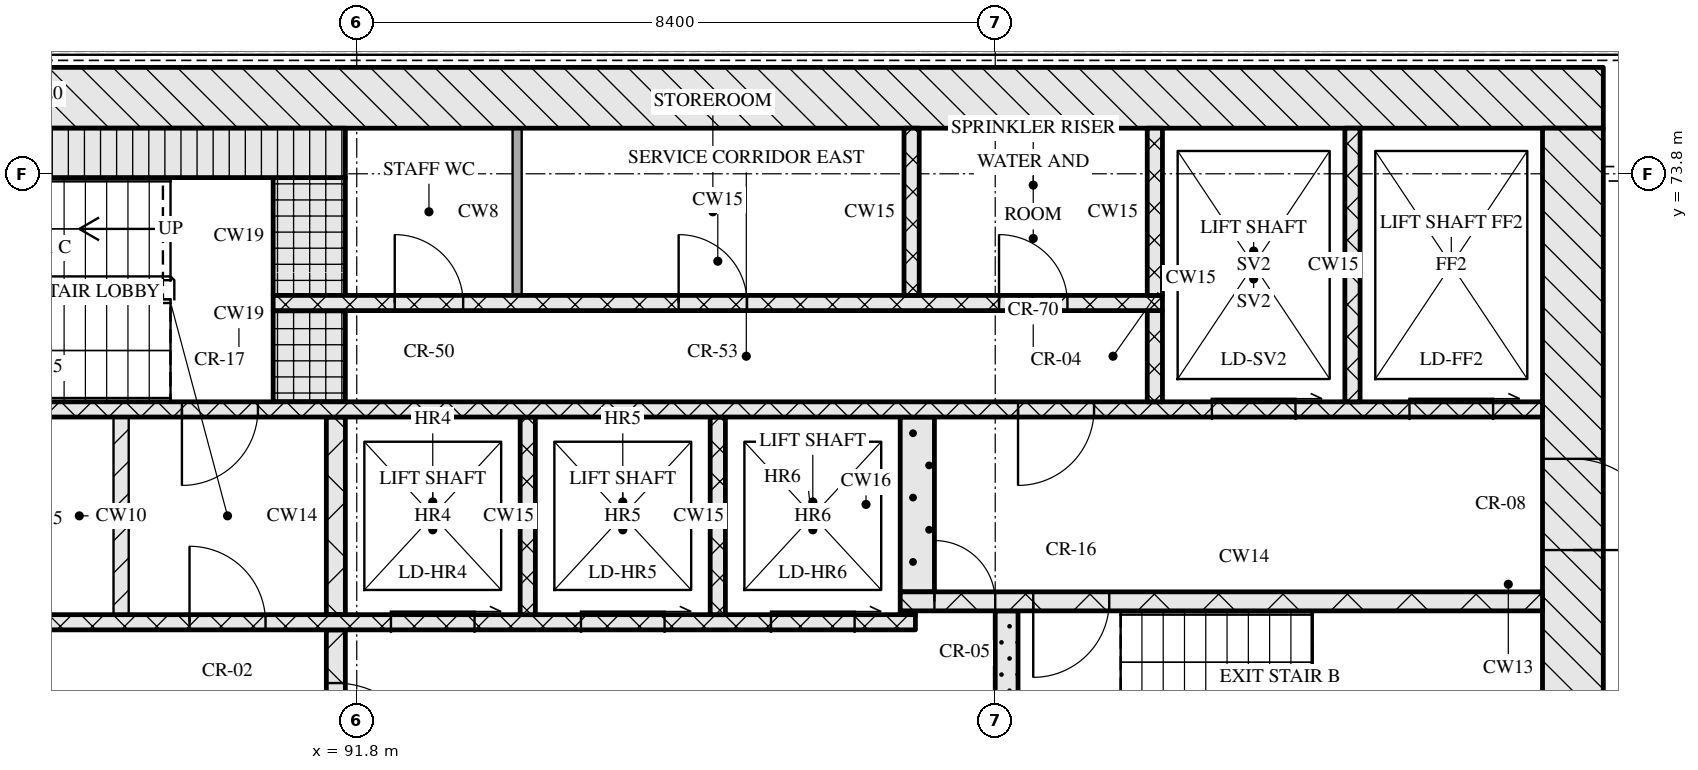
"""IFC4 building model, lengths in metres.
Left out: names, types, materials, properties, quantities, classifications, styles, units other than length and angle.
Written with IfcOpenShell. Run it as: python <this file> out.ifc"""

import sys

from ifc_helpers import new_model, si_unit, direction, frame, frame_2d, origin, place, context, subcontext, project, spatial, rectangle, extrude, element, fill, save


model = new_model("IFC4")
c1 = context("Model", 3, precision=1e-05, world=origin(), true_north=direction((0.0, 1.0)))
c2 = subcontext(c1, "Body", "Model", "MODEL_VIEW")
j1 = project(units=[si_unit("LENGTHUNIT", "METRE"), si_unit("PLANEANGLEUNIT", "RADIAN")], contexts=[c1])
p1 = place(None, origin())
s1 = spatial("IfcSite", under=j1, at=p1, CompositionType="ELEMENT")
p2 = place(p1, origin())
s2 = spatial("IfcBuilding", under=s1, at=p2, CompositionType="ELEMENT")
p3 = place(p2, frame((0.0, 0.0, 165.45)))
s3 = spatial("IfcBuildingStorey", under=s2, at=p3, CompositionType="ELEMENT", Elevation=165.45)
p4 = place(p3, frame((67.0, 74.8, 0.0), z_axis=(0.0, 0.0, 1.0), x_axis=(1.0, 0.0, 0.0)))
e1 = element("IfcWall", 1, at=p4, inside=s3, PredefinedType="SOLIDWALL", context=c2, shape_type="SweptSolid", body=[
    extrude(rectangle(XDim=41.2, YDim=0.8, at=frame_2d((20.6, 0.0))), origin(), (0.0, 0.0, 1.0), 3.32),
])
p5 = place(p3, frame((107.8, 62.4, 0.0), z_axis=(0.0, 0.0, 1.0), x_axis=(0.0, 1.0, 0.0)))
e2 = element("IfcWall", 2, at=p5, inside=s3, PredefinedType="SOLIDWALL", context=c2, shape_type="SweptSolid", body=[
    extrude(rectangle(XDim=12.0, YDim=0.8, at=frame_2d((6.0, 0.0))), origin(), (0.0, 0.0, 1.0), 3.32),
])
p6 = place(p5, frame((6.45, 0.0, 0.0)))
e3 = element("IfcOpeningElement", 3, at=p6, cuts=e2, PredefinedType="OPENING", context=c2, shape_type="SweptSolid", body=[
    extrude(rectangle(XDim=1.2, YDim=2.1, at=frame_2d((0.6, 1.05))), frame((0.0, 0.41, 0.0), z_axis=(0.0, -1.0, 0.0), x_axis=(1.0, 0.0, 0.0)), (0.0, 0.0, 1.0), 0.82),
])
p7 = place(p3, frame((91.525, 65.2, 0.0), z_axis=(0.0, 0.0, 1.0), x_axis=(0.0, 1.0, 0.0)))
e4 = element("IfcWall", 4, at=p7, inside=s3, PredefinedType="SOLIDWALL", context=c2, shape_type="SweptSolid", body=[
    extrude(rectangle(XDim=2.6, YDim=0.25, at=frame_2d((1.3, 0.0))), origin(), (0.0, 0.0, 1.0), 3.32),
])
p8 = place(p7, frame((0.7, 0.0, 0.0)))
e5 = element("IfcOpeningElement", 5, at=p8, cuts=e4, PredefinedType="OPENING", context=c2, shape_type="SweptSolid", body=[
    extrude(rectangle(XDim=1.2, YDim=2.1, at=frame_2d((0.6, 1.05))), frame((0.0, 0.135, 0.0), z_axis=(0.0, -1.0, 0.0), x_axis=(1.0, 0.0, 0.0)), (0.0, 0.0, 1.0), 0.27),
])
p9 = place(p3, frame((100.35, 65.2, 0.0), z_axis=(0.0, 0.0, 1.0), x_axis=(0.0, 1.0, 0.0)))
e6 = element("IfcWall", 6, at=p9, inside=s3, PredefinedType="SOLIDWALL", context=c2, shape_type="SweptSolid", body=[
    extrude(rectangle(XDim=2.85, YDim=0.3, at=frame_2d((1.425, 0.0))), origin(), (0.0, 0.0, 1.0), 3.32),
])
p10 = place(p3, frame((76.05, 67.9, 0.0), z_axis=(0.0, 0.0, 1.0), x_axis=(1.0, 0.0, 0.0)))
e7 = element("IfcWall", 7, at=p10, inside=s3, PredefinedType="SOLIDWALL", context=c2, shape_type="SweptSolid", body=[
    extrude(rectangle(XDim=23.1, YDim=0.2, at=frame_2d((11.55, 0.0))), origin(), (0.0, 0.0, 1.0), 3.32),
])
p11 = place(p10, frame((3.2, 0.0, 0.0)))
e8 = element("IfcOpeningElement", 8, at=p11, cuts=e7, PredefinedType="OPENING", context=c2, shape_type="SweptSolid", body=[
    extrude(rectangle(XDim=0.9, YDim=2.1, at=frame_2d((0.45, 1.05))), frame((0.0, 0.11, 0.0), z_axis=(0.0, -1.0, 0.0), x_axis=(1.0, 0.0, 0.0)), (0.0, 0.0, 1.0), 0.22),
])
p12 = place(p10, frame((9.7, 0.0, 0.0)))
e9 = element("IfcOpeningElement", 9, at=p12, cuts=e7, PredefinedType="OPENING", context=c2, shape_type="SweptSolid", body=[
    extrude(rectangle(XDim=0.9, YDim=2.1, at=frame_2d((0.45, 1.05))), frame((0.0, 0.11, 0.0), z_axis=(0.0, -1.0, 0.0), x_axis=(1.0, 0.0, 0.0)), (0.0, 0.0, 1.0), 0.22),
])
p13 = place(p10, frame((13.55, 0.0, 0.0)))
e10 = element("IfcOpeningElement", 10, at=p13, cuts=e7, PredefinedType="OPENING", context=c2, shape_type="SweptSolid", body=[
    extrude(rectangle(XDim=1.0, YDim=2.1, at=frame_2d((0.5, 1.05))), frame((0.0, 0.11, 0.0), z_axis=(0.0, -1.0, 0.0), x_axis=(1.0, 0.0, 0.0)), (0.0, 0.0, 1.0), 0.22),
])
p14 = place(p10, frame((16.2, 0.0, 0.0)))
e11 = element("IfcOpeningElement", 11, at=p14, cuts=e7, PredefinedType="OPENING", context=c2, shape_type="SweptSolid", body=[
    extrude(rectangle(XDim=1.1, YDim=2.1, at=frame_2d((0.55, 1.05))), frame((0.0, 0.11, 0.0), z_axis=(0.0, -1.0, 0.0), x_axis=(1.0, 0.0, 0.0)), (0.0, 0.0, 1.0), 0.22),
])
p15 = place(p10, frame((18.7, 0.0, 0.0)))
e12 = element("IfcOpeningElement", 12, at=p15, cuts=e7, PredefinedType="OPENING", context=c2, shape_type="SweptSolid", body=[
    extrude(rectangle(XDim=1.1, YDim=2.1, at=frame_2d((0.55, 1.05))), frame((0.0, 0.11, 0.0), z_axis=(0.0, -1.0, 0.0), x_axis=(1.0, 0.0, 0.0)), (0.0, 0.0, 1.0), 0.22),
])
p16 = place(p10, frame((21.2, 0.0, 0.0)))
e13 = element("IfcOpeningElement", 13, at=p16, cuts=e7, PredefinedType="OPENING", context=c2, shape_type="SweptSolid", body=[
    extrude(rectangle(XDim=1.1, YDim=2.1, at=frame_2d((0.55, 1.05))), frame((0.0, 0.11, 0.0), z_axis=(0.0, -1.0, 0.0), x_axis=(1.0, 0.0, 0.0)), (0.0, 0.0, 1.0), 0.22),
])
p17 = place(p3, frame((88.7, 68.0, 0.0), z_axis=(0.0, 0.0, 1.0), x_axis=(0.0, 1.0, 0.0)))
e14 = element("IfcWall", 14, at=p17, inside=s3, PredefinedType="PARTITIONING", context=c2, shape_type="SweptSolid", body=[
    extrude(rectangle(XDim=2.6, YDim=0.2, at=frame_2d((1.3, 0.0))), origin(), (0.0, 0.0, 1.0), 3.32),
])
p18 = place(p3, frame((91.525, 68.0, 0.0), z_axis=(0.0, 0.0, 1.0), x_axis=(0.0, 1.0, 0.0)))
e15 = element("IfcWall", 15, at=p18, inside=s3, PredefinedType="SOLIDWALL", context=c2, shape_type="SweptSolid", body=[
    extrude(rectangle(XDim=2.6, YDim=0.25, at=frame_2d((1.3, 0.0))), origin(), (0.0, 0.0, 1.0), 3.32),
])
for number, where, z_axis, x_axis in (
    (16, (94.05, 68.0, 0.0), (0.0, 0.0, 1.0), (0.0, 1.0, 0.0)),
    (17, (96.55, 68.0, 0.0), (0.0, 0.0, 1.0), (0.0, 1.0, 0.0)),
):
    element("IfcWall", number, at=place(p3, frame(where, z_axis=z_axis, x_axis=x_axis)), inside=s3, PredefinedType="SOLIDWALL", context=c2, shape_type="SweptSolid", body=[
        extrude(rectangle(XDim=2.6, YDim=0.2, at=frame_2d((1.3, 0.0))), origin(), (0.0, 0.0, 1.0), 3.32),
    ])
p19 = place(p3, frame((98.95, 68.025, 0.0), z_axis=(0.0, 0.0, 1.0), x_axis=(1.0, 0.0, 0.0)))
e18 = element("IfcWall", 18, at=p19, inside=s3, PredefinedType="SOLIDWALL", context=c2, shape_type="SweptSolid", body=[
    extrude(rectangle(XDim=0.2, YDim=0.05, at=frame_2d((0.1, 0.0))), origin(), (0.0, 0.0, 1.0), 3.32),
])
p20 = place(p3, frame((98.95, 68.175, 0.0), z_axis=(0.0, 0.0, 1.0), x_axis=(1.0, 0.0, 0.0)))
e19 = element("IfcWall", 19, at=p20, inside=s3, PredefinedType="SOLIDWALL", context=c2, shape_type="SweptSolid", body=[
    extrude(rectangle(XDim=8.45, YDim=0.25, at=frame_2d((4.225, 0.0))), origin(), (0.0, 0.0, 1.0), 3.32),
])
p21 = place(p20, frame((0.45, 0.0, 0.0)))
e20 = element("IfcOpeningElement", 20, at=p21, cuts=e19, PredefinedType="OPENING", context=c2, shape_type="SweptSolid", body=[
    extrude(rectangle(XDim=0.8, YDim=2.1, at=frame_2d((0.4, 1.05))), frame((0.0, 0.135, 0.0), z_axis=(0.0, -1.0, 0.0), x_axis=(1.0, 0.0, 0.0)), (0.0, 0.0, 1.0), 0.27),
])
p22 = place(p20, frame((1.75, 0.0, 0.0)))
e21 = element("IfcOpeningElement", 21, at=p22, cuts=e19, PredefinedType="OPENING", context=c2, shape_type="SweptSolid", body=[
    extrude(rectangle(XDim=1.0, YDim=2.1, at=frame_2d((0.5, 1.05))), frame((0.0, 0.135, 0.0), z_axis=(0.0, -1.0, 0.0), x_axis=(1.0, 0.0, 0.0)), (0.0, 0.0, 1.0), 0.27),
])
p23 = place(p3, frame((99.175, 68.3, 0.0), z_axis=(0.0, 0.0, 1.0), x_axis=(0.0, 1.0, 0.0)))
e22 = element("IfcWall", 22, at=p23, inside=s3, PredefinedType="SOLIDWALL", context=c2, shape_type="SweptSolid", body=[
    extrude(rectangle(XDim=2.3, YDim=0.45, at=frame_2d((1.15, 0.0))), origin(), (0.0, 0.0, 1.0), 3.32),
])
p24 = place(p3, frame((67.8, 70.7, 0.0), z_axis=(0.0, 0.0, 1.0), x_axis=(1.0, 0.0, 0.0)))
e23 = element("IfcWall", 23, at=p24, inside=s3, PredefinedType="SOLIDWALL", context=c2, shape_type="SweptSolid", body=[
    extrude(rectangle(XDim=39.6, YDim=0.2, at=frame_2d((19.8, 0.0))), origin(), (0.0, 0.0, 1.0), 3.32),
])
p25 = place(p24, frame((0.65, 0.0, 0.0)))
e24 = element("IfcOpeningElement", 24, at=p25, cuts=e23, PredefinedType="OPENING", context=c2, shape_type="SweptSolid", body=[
    extrude(rectangle(XDim=1.1, YDim=2.1, at=frame_2d((0.55, 1.05))), frame((0.0, 0.11, 0.0), z_axis=(0.0, -1.0, 0.0), x_axis=(1.0, 0.0, 0.0)), (0.0, 0.0, 1.0), 0.22),
])
p26 = place(p24, frame((3.25, 0.0, 0.0)))
e25 = element("IfcOpeningElement", 25, at=p26, cuts=e23, PredefinedType="OPENING", context=c2, shape_type="SweptSolid", body=[
    extrude(rectangle(XDim=1.1, YDim=2.1, at=frame_2d((0.55, 1.05))), frame((0.0, 0.11, 0.0), z_axis=(0.0, -1.0, 0.0), x_axis=(1.0, 0.0, 0.0)), (0.0, 0.0, 1.0), 0.22),
])
p27 = place(p24, frame((5.9, 0.0, 0.0)))
e26 = element("IfcOpeningElement", 26, at=p27, cuts=e23, PredefinedType="OPENING", context=c2, shape_type="SweptSolid", body=[
    extrude(rectangle(XDim=1.0, YDim=2.1, at=frame_2d((0.5, 1.05))), frame((0.0, 0.11, 0.0), z_axis=(0.0, -1.0, 0.0), x_axis=(1.0, 0.0, 0.0)), (0.0, 0.0, 1.0), 0.22),
])
p28 = place(p24, frame((21.7, 0.0, 0.0)))
e27 = element("IfcOpeningElement", 27, at=p28, cuts=e23, PredefinedType="OPENING", context=c2, shape_type="SweptSolid", body=[
    extrude(rectangle(XDim=1.0, YDim=2.1, at=frame_2d((0.5, 1.05))), frame((0.0, 0.11, 0.0), z_axis=(0.0, -1.0, 0.0), x_axis=(1.0, 0.0, 0.0)), (0.0, 0.0, 1.0), 0.22),
])
p29 = place(p24, frame((32.7, 0.0, 0.0)))
e28 = element("IfcOpeningElement", 28, at=p29, cuts=e23, PredefinedType="OPENING", context=c2, shape_type="SweptSolid", body=[
    extrude(rectangle(XDim=1.0, YDim=2.1, at=frame_2d((0.5, 1.05))), frame((0.0, 0.11, 0.0), z_axis=(0.0, -1.0, 0.0), x_axis=(1.0, 0.0, 0.0)), (0.0, 0.0, 1.0), 0.22),
])
p30 = place(p24, frame((35.25, 0.0, 0.0)))
e29 = element("IfcOpeningElement", 29, at=p30, cuts=e23, PredefinedType="OPENING", context=c2, shape_type="SweptSolid", body=[
    extrude(rectangle(XDim=1.1, YDim=2.1, at=frame_2d((0.55, 1.05))), frame((0.0, 0.11, 0.0), z_axis=(0.0, -1.0, 0.0), x_axis=(1.0, 0.0, 0.0)), (0.0, 0.0, 1.0), 0.22),
])
p31 = place(p24, frame((37.85, 0.0, 0.0)))
e30 = element("IfcOpeningElement", 30, at=p31, cuts=e23, PredefinedType="OPENING", context=c2, shape_type="SweptSolid", body=[
    extrude(rectangle(XDim=1.1, YDim=2.1, at=frame_2d((0.55, 1.05))), frame((0.0, 0.11, 0.0), z_axis=(0.0, -1.0, 0.0), x_axis=(1.0, 0.0, 0.0)), (0.0, 0.0, 1.0), 0.22),
])
p32 = place(p3, frame((91.175, 70.8, 0.0), z_axis=(0.0, 0.0, 1.0), x_axis=(0.0, 1.0, 0.0)))
e31 = element("IfcWall", 31, at=p32, inside=s3, PredefinedType="SOLIDWALL", context=c2, shape_type="SweptSolid", body=[
    extrude(rectangle(XDim=1.2, YDim=0.95, at=frame_2d((0.6, 0.0))), origin(), (0.0, 0.0, 1.0), 3.32),
])
p33 = place(p3, frame((102.3, 70.8, 0.0), z_axis=(0.0, 0.0, 1.0), x_axis=(0.0, 1.0, 0.0)))
e32 = element("IfcWall", 32, at=p33, inside=s3, PredefinedType="SOLIDWALL", context=c2, shape_type="SweptSolid", body=[
    extrude(rectangle(XDim=1.2, YDim=0.2, at=frame_2d((0.6, 0.0))), origin(), (0.0, 0.0, 1.0), 3.32),
])
p34 = place(p3, frame((104.9, 70.8, 0.0), z_axis=(0.0, 0.0, 1.0), x_axis=(0.0, 1.0, 0.0)))
e33 = element("IfcWall", 33, at=p34, inside=s3, PredefinedType="SOLIDWALL", context=c2, shape_type="SweptSolid", body=[
    extrude(rectangle(XDim=3.6, YDim=0.2, at=frame_2d((1.8, 0.0))), origin(), (0.0, 0.0, 1.0), 3.32),
])
p35 = place(p3, frame((90.7, 72.1, 0.0), z_axis=(0.0, 0.0, 1.0), x_axis=(1.0, 0.0, 0.0)))
e34 = element("IfcWall", 34, at=p35, inside=s3, PredefinedType="SOLIDWALL", context=c2, shape_type="SweptSolid", body=[
    extrude(rectangle(XDim=11.7, YDim=0.2, at=frame_2d((5.85, 0.0))), origin(), (0.0, 0.0, 1.0), 3.32),
])
p36 = place(p35, frame((1.6, 0.0, 0.0)))
e35 = element("IfcOpeningElement", 35, at=p36, cuts=e34, PredefinedType="OPENING", context=c2, shape_type="SweptSolid", body=[
    extrude(rectangle(XDim=0.9, YDim=2.1, at=frame_2d((0.45, 1.05))), frame((0.0, 0.11, 0.0), z_axis=(0.0, -1.0, 0.0), x_axis=(1.0, 0.0, 0.0)), (0.0, 0.0, 1.0), 0.22),
])
p37 = place(p35, frame((5.335, 0.0, 0.0)))
e36 = element("IfcOpeningElement", 36, at=p37, cuts=e34, PredefinedType="OPENING", context=c2, shape_type="SweptSolid", body=[
    extrude(rectangle(XDim=0.9, YDim=2.1, at=frame_2d((0.45, 1.05))), frame((0.0, 0.11, 0.0), z_axis=(0.0, -1.0, 0.0), x_axis=(1.0, 0.0, 0.0)), (0.0, 0.0, 1.0), 0.22),
])
p38 = place(p35, frame((9.55, 0.0, 0.0)))
e37 = element("IfcOpeningElement", 37, at=p38, cuts=e34, PredefinedType="OPENING", context=c2, shape_type="SweptSolid", body=[
    extrude(rectangle(XDim=0.9, YDim=2.1, at=frame_2d((0.45, 1.05))), frame((0.0, 0.11, 0.0), z_axis=(0.0, -1.0, 0.0), x_axis=(1.0, 0.0, 0.0)), (0.0, 0.0, 1.0), 0.22),
])
p39 = place(p3, frame((91.175, 72.2, 0.0), z_axis=(0.0, 0.0, 1.0), x_axis=(0.0, 1.0, 0.0)))
e38 = element("IfcWall", 38, at=p39, inside=s3, PredefinedType="SOLIDWALL", context=c2, shape_type="SweptSolid", body=[
    extrude(rectangle(XDim=1.55, YDim=0.95, at=frame_2d((0.775, 0.0))), origin(), (0.0, 0.0, 1.0), 3.32),
])
p40 = place(p3, frame((93.91, 72.2, 0.0), z_axis=(0.0, 0.0, 1.0), x_axis=(0.0, 1.0, 0.0)))
e39 = element("IfcWall", 39, at=p40, inside=s3, PredefinedType="PARTITIONING", context=c2, shape_type="SweptSolid", body=[
    extrude(rectangle(XDim=2.2, YDim=0.12, at=frame_2d((1.1, 0.0))), origin(), (0.0, 0.0, 1.0), 3.32),
])
for number, where, z_axis, x_axis in (
    (40, (99.1, 72.2, 0.0), (0.0, 0.0, 1.0), (0.0, 1.0, 0.0)),
    (41, (102.3, 72.2, 0.0), (0.0, 0.0, 1.0), (0.0, 1.0, 0.0)),
):
    element("IfcWall", number, at=place(p3, frame(where, z_axis=z_axis, x_axis=x_axis)), inside=s3, PredefinedType="SOLIDWALL", context=c2, shape_type="SweptSolid", body=[
        extrude(rectangle(XDim=2.2, YDim=0.2, at=frame_2d((1.1, 0.0))), origin(), (0.0, 0.0, 1.0), 3.32),
    ])
p41 = place(p3, frame((83.55, 74.075, 0.0), z_axis=(0.0, 0.0, 1.0), x_axis=(1.0, 0.0, 0.0)))
e42 = element("IfcWall", 42, at=p41, inside=s3, PredefinedType="SOLIDWALL", context=c2, shape_type="SweptSolid", body=[
    extrude(rectangle(XDim=8.1, YDim=0.65, at=frame_2d((4.05, 0.0))), origin(), (0.0, 0.0, 1.0), 3.32),
])
p42 = place(p8, origin())
e43 = element("IfcDoor", 43, at=p42, inside=s3, OperationType="SINGLE_SWING_RIGHT", PredefinedType="DOOR", context=c2, shape_type="SweptSolid", body=[
    extrude(rectangle(XDim=1.2, YDim=2.1, at=frame_2d((0.6, 1.05))), frame((0.0, 0.025, 0.0), z_axis=(0.0, -1.0, 0.0), x_axis=(1.0, 0.0, 0.0)), (0.0, 0.0, 1.0), 0.05),
])
fill(e5, e43)
p43 = place(p13, origin())
e44 = element("IfcDoor", 44, at=p43, inside=s3, OperationType="SINGLE_SWING_LEFT", PredefinedType="DOOR", context=c2, shape_type="SweptSolid", body=[
    extrude(rectangle(XDim=1.0, YDim=2.1, at=frame_2d((0.5, 1.05))), frame((0.0, 0.025, 0.0), z_axis=(0.0, -1.0, 0.0), x_axis=(1.0, 0.0, 0.0)), (0.0, 0.0, 1.0), 0.05),
])
fill(e10, e44)
p44 = place(p14, origin())
e45 = element("IfcDoor", 45, at=p44, inside=s3, OperationType="SLIDING_TO_RIGHT", PredefinedType="DOOR", context=c2, shape_type="SweptSolid", body=[
    extrude(rectangle(XDim=1.1, YDim=2.1, at=frame_2d((0.55, 1.05))), frame((0.0, 0.025, 0.0), z_axis=(0.0, -1.0, 0.0), x_axis=(1.0, 0.0, 0.0)), (0.0, 0.0, 1.0), 0.05),
])
fill(e11, e45)
p45 = place(p15, origin())
e46 = element("IfcDoor", 46, at=p45, inside=s3, OperationType="SLIDING_TO_RIGHT", PredefinedType="DOOR", context=c2, shape_type="SweptSolid", body=[
    extrude(rectangle(XDim=1.1, YDim=2.1, at=frame_2d((0.55, 1.05))), frame((0.0, 0.025, 0.0), z_axis=(0.0, -1.0, 0.0), x_axis=(1.0, 0.0, 0.0)), (0.0, 0.0, 1.0), 0.05),
])
fill(e12, e46)
p46 = place(p16, origin())
e47 = element("IfcDoor", 47, at=p46, inside=s3, OperationType="SLIDING_TO_RIGHT", PredefinedType="DOOR", context=c2, shape_type="SweptSolid", body=[
    extrude(rectangle(XDim=1.1, YDim=2.1, at=frame_2d((0.55, 1.05))), frame((0.0, 0.025, 0.0), z_axis=(0.0, -1.0, 0.0), x_axis=(1.0, 0.0, 0.0)), (0.0, 0.0, 1.0), 0.05),
])
fill(e13, e47)
p47 = place(p21, origin())
e48 = element("IfcDoor", 48, at=p47, inside=s3, OperationType="SINGLE_SWING_LEFT", PredefinedType="DOOR", context=c2, shape_type="SweptSolid", body=[
    extrude(rectangle(XDim=0.8, YDim=2.1, at=frame_2d((0.4, 1.05))), frame((0.0, 0.025, 0.0), z_axis=(0.0, -1.0, 0.0), x_axis=(1.0, 0.0, 0.0)), (0.0, 0.0, 1.0), 0.05),
])
fill(e20, e48)
p48 = place(p22, origin())
e49 = element("IfcDoor", 49, at=p48, inside=s3, OperationType="SINGLE_SWING_RIGHT", PredefinedType="DOOR", context=c2, shape_type="SweptSolid", body=[
    extrude(rectangle(XDim=1.0, YDim=2.1, at=frame_2d((0.5, 1.05))), frame((0.0, 0.025, 0.0), z_axis=(0.0, -1.0, 0.0), x_axis=(1.0, 0.0, 0.0)), (0.0, 0.0, 1.0), 0.05),
])
fill(e21, e49)
p49 = place(p6, origin())
e50 = element("IfcDoor", 50, at=p49, inside=s3, OperationType="SINGLE_SWING_RIGHT", PredefinedType="DOOR", context=c2, shape_type="SweptSolid", body=[
    extrude(rectangle(XDim=1.2, YDim=2.1, at=frame_2d((0.6, 1.05))), frame((0.0, 0.025, 0.0), z_axis=(0.0, -1.0, 0.0), x_axis=(1.0, 0.0, 0.0)), (0.0, 0.0, 1.0), 0.05),
])
fill(e3, e50)
p50 = place(p28, origin())
e51 = element("IfcDoor", 51, at=p50, inside=s3, OperationType="SINGLE_SWING_RIGHT", PredefinedType="DOOR", context=c2, shape_type="SweptSolid", body=[
    extrude(rectangle(XDim=1.0, YDim=2.1, at=frame_2d((0.5, 1.05))), frame((0.0, 0.025, 0.0), z_axis=(0.0, -1.0, 0.0), x_axis=(1.0, 0.0, 0.0)), (0.0, 0.0, 1.0), 0.05),
])
fill(e27, e51)
p51 = place(p29, origin())
e52 = element("IfcDoor", 52, at=p51, inside=s3, OperationType="SINGLE_SWING_RIGHT", PredefinedType="DOOR", context=c2, shape_type="SweptSolid", body=[
    extrude(rectangle(XDim=1.0, YDim=2.1, at=frame_2d((0.5, 1.05))), frame((0.0, 0.025, 0.0), z_axis=(0.0, -1.0, 0.0), x_axis=(1.0, 0.0, 0.0)), (0.0, 0.0, 1.0), 0.05),
])
fill(e28, e52)
p52 = place(p30, origin())
e53 = element("IfcDoor", 53, at=p52, inside=s3, OperationType="SLIDING_TO_RIGHT", PredefinedType="DOOR", context=c2, shape_type="SweptSolid", body=[
    extrude(rectangle(XDim=1.1, YDim=2.1, at=frame_2d((0.55, 1.05))), frame((0.0, 0.025, 0.0), z_axis=(0.0, -1.0, 0.0), x_axis=(1.0, 0.0, 0.0)), (0.0, 0.0, 1.0), 0.05),
])
fill(e29, e53)
p53 = place(p31, origin())
e54 = element("IfcDoor", 54, at=p53, inside=s3, OperationType="SLIDING_TO_RIGHT", PredefinedType="DOOR", context=c2, shape_type="SweptSolid", body=[
    extrude(rectangle(XDim=1.1, YDim=2.1, at=frame_2d((0.55, 1.05))), frame((0.0, 0.025, 0.0), z_axis=(0.0, -1.0, 0.0), x_axis=(1.0, 0.0, 0.0)), (0.0, 0.0, 1.0), 0.05),
])
fill(e30, e54)
p54 = place(p36, origin())
e55 = element("IfcDoor", 55, at=p54, inside=s3, OperationType="SINGLE_SWING_LEFT", PredefinedType="DOOR", context=c2, shape_type="SweptSolid", body=[
    extrude(rectangle(XDim=0.9, YDim=2.1, at=frame_2d((0.45, 1.05))), frame((0.0, 0.025, 0.0), z_axis=(0.0, -1.0, 0.0), x_axis=(1.0, 0.0, 0.0)), (0.0, 0.0, 1.0), 0.05),
])
fill(e35, e55)
p55 = place(p37, origin())
e56 = element("IfcDoor", 56, at=p55, inside=s3, OperationType="SINGLE_SWING_LEFT", PredefinedType="DOOR", context=c2, shape_type="SweptSolid", body=[
    extrude(rectangle(XDim=0.9, YDim=2.1, at=frame_2d((0.45, 1.05))), frame((0.0, 0.025, 0.0), z_axis=(0.0, -1.0, 0.0), x_axis=(1.0, 0.0, 0.0)), (0.0, 0.0, 1.0), 0.05),
])
fill(e36, e56)
p56 = place(p38, origin())
e57 = element("IfcDoor", 57, at=p56, inside=s3, OperationType="SINGLE_SWING_LEFT", PredefinedType="DOOR", context=c2, shape_type="SweptSolid", body=[
    extrude(rectangle(XDim=0.9, YDim=2.1, at=frame_2d((0.45, 1.05))), frame((0.0, 0.025, 0.0), z_axis=(0.0, -1.0, 0.0), x_axis=(1.0, 0.0, 0.0)), (0.0, 0.0, 1.0), 0.05),
])
fill(e37, e57)
save(model, sys.argv[1])
